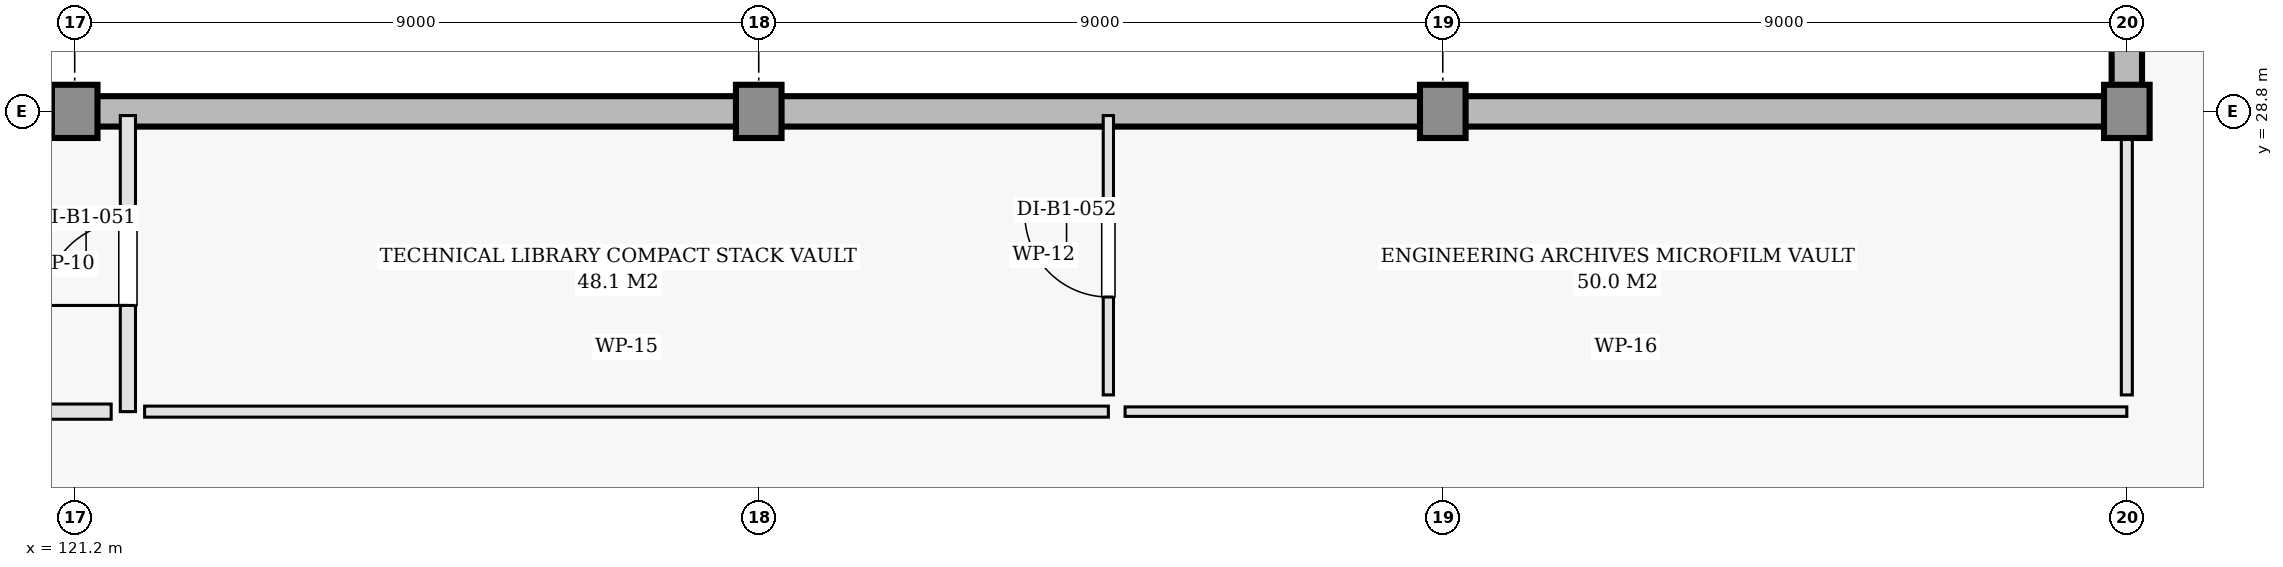
"""IFC4 building model, lengths in metres.
Left out: names, types, materials, properties, quantities, classifications, styles, units other than length and angle.
Written with IfcOpenShell. Run it as: python <this file> out.ifc"""

import sys

from ifc_helpers import new_model, si_unit, direction, frame, frame_2d, origin, origin_2d, place, context, subcontext, project, spatial, rectangle, extrude, element, fill, save


model = new_model("IFC4")
c1 = context("Model", 3, precision=1e-05, world=origin(), true_north=direction((0.0, 1.0)))
c2 = subcontext(c1, "Body", "Model", "MODEL_VIEW")
j1 = project(units=[si_unit("LENGTHUNIT", "METRE"), si_unit("PLANEANGLEUNIT", "RADIAN")], contexts=[c1])
p1 = place(None, origin())
s1 = spatial("IfcSite", under=j1, at=p1, CompositionType="ELEMENT")
p2 = place(p1, origin())
s2 = spatial("IfcBuilding", under=s1, at=p2, CompositionType="ELEMENT")
p3 = place(p2, frame((0.0, 0.0, -4.5)))
s3 = spatial("IfcBuildingStorey", under=s2, at=p3, CompositionType="ELEMENT", Elevation=-4.5)
for number, where, z_axis, x_axis in (
    (1, (121.2, 28.8, 0.0), (0.0, 0.0, 1.0), (1.0, 0.0, 0.0)),
    (2, (130.2, 28.8, 0.0), (0.0, 0.0, 1.0), (1.0, 0.0, 0.0)),
    (3, (139.2, 28.8, 0.0), (0.0, 0.0, 1.0), (1.0, 0.0, 0.0)),
    (4, (148.2, 28.8, 0.0), (0.0, 0.0, 1.0), (1.0, 0.0, 0.0)),
):
    element("IfcColumn", number, at=place(p3, frame(where, z_axis=z_axis, x_axis=x_axis)), inside=s3, PredefinedType="COLUMN", context=c2, shape_type="SweptSolid", body=[
        extrude(rectangle(XDim=0.7, YDim=0.7, at=origin_2d()), origin(), (0.0, 0.0, 1.0), 4.5),
    ])
p4 = place(p3, frame((148.2, 57.6, 0.0), z_axis=(0.0, 0.0, 1.0), x_axis=(0.0, -1.0, 0.0)))
e5 = element("IfcWall", 5, at=p4, inside=s3, PredefinedType="USERDEFINED", context=c2, shape_type="SweptSolid", body=[
    extrude(rectangle(XDim=28.8, YDim=0.4, at=frame_2d((14.4, 0.0))), origin(), (0.0, 0.0, 1.0), 4.15),
])
p5 = place(p3, frame((148.2, 28.8, 0.0), z_axis=(0.0, 0.0, 1.0), x_axis=(-1.0, 0.0, 0.0)))
e6 = element("IfcWall", 6, at=p5, inside=s3, PredefinedType="USERDEFINED", context=c2, shape_type="SweptSolid", body=[
    extrude(rectangle(XDim=36.0, YDim=0.4, at=frame_2d((18.0, 0.0))), origin(), (0.0, 0.0, 1.0), 4.15),
])
p6 = place(p3, frame((121.9, 24.85, 0.0), z_axis=(0.0, 0.0, 1.0), x_axis=(0.0, 1.0, 0.0)))
e7 = element("IfcWall", 7, at=p6, inside=s3, PredefinedType="PARTITIONING", context=c2, shape_type="SweptSolid", body=[
    extrude(rectangle(XDim=3.895, YDim=0.2, at=frame_2d((1.948, 0.0))), origin(), (0.0, 0.0, 1.0), 3.335),
])
p7 = place(p6, frame((1.397, 0.0, 0.0)))
e8 = element("IfcOpeningElement", 8, at=p7, cuts=e7, PredefinedType="OPENING", context=c2, shape_type="SweptSolid", body=[
    extrude(rectangle(XDim=1.1, YDim=2.15, at=frame_2d((0.55, 1.075))), frame((0.0, 0.11, 0.0), z_axis=(0.0, -1.0, 0.0), x_axis=(1.0, 0.0, 0.0)), (0.0, 0.0, 1.0), 0.22),
])
p8 = place(p3, frame((122.12, 24.85, 0.0), z_axis=(0.0, 0.0, 1.0), x_axis=(1.0, 0.0, 0.0)))
e9 = element("IfcWall", 9, at=p8, inside=s3, PredefinedType="PARTITIONING", context=c2, shape_type="SweptSolid", body=[
    extrude(rectangle(XDim=12.68, YDim=0.145, at=frame_2d((6.34, 0.0))), origin(), (0.0, 0.0, 1.0), 4.15),
])
p9 = place(p3, frame((134.8, 25.07, 0.0), z_axis=(0.0, 0.0, 1.0), x_axis=(0.0, 1.0, 0.0)))
e10 = element("IfcWall", 10, at=p9, inside=s3, PredefinedType="PARTITIONING", context=c2, shape_type="SweptSolid", body=[
    extrude(rectangle(XDim=3.675, YDim=0.135, at=frame_2d((1.837, 0.0))), origin(), (0.0, 0.0, 1.0), 3.335),
])
p10 = place(p9, frame((1.288, 0.0, 0.0)))
e11 = element("IfcOpeningElement", 11, at=p10, cuts=e10, PredefinedType="OPENING", context=c2, shape_type="SweptSolid", body=[
    extrude(rectangle(XDim=1.1, YDim=2.15, at=frame_2d((0.55, 1.075))), frame((0.0, 0.078, 0.0), z_axis=(0.0, -1.0, 0.0), x_axis=(1.0, 0.0, 0.0)), (0.0, 0.0, 1.0), 0.155),
])
p11 = place(p3, frame((135.02, 24.85, 0.0), z_axis=(0.0, 0.0, 1.0), x_axis=(1.0, 0.0, 0.0)))
e12 = element("IfcWall", 12, at=p11, inside=s3, PredefinedType="PARTITIONING", context=c2, shape_type="SweptSolid", body=[
    extrude(rectangle(XDim=13.18, YDim=0.125, at=frame_2d((6.59, 0.0))), origin(), (0.0, 0.0, 1.0), 3.485),
])
p12 = place(p3, frame((148.2, 25.07, 0.0), z_axis=(0.0, 0.0, 1.0), x_axis=(0.0, 1.0, 0.0)))
e13 = element("IfcWall", 13, at=p12, inside=s3, PredefinedType="PARTITIONING", context=c2, shape_type="SweptSolid", body=[
    extrude(rectangle(XDim=3.47, YDim=0.145, at=frame_2d((1.735, 0.0))), origin(), (0.0, 0.0, 1.0), 3.485),
])
p13 = place(p3, frame((112.255, 24.85, 0.0), z_axis=(0.0, 0.0, 1.0), x_axis=(1.0, 0.0, 0.0)))
e14 = element("IfcWall", 14, at=p13, inside=s3, PredefinedType="PARTITIONING", context=c2, shape_type="SweptSolid", body=[
    extrude(rectangle(XDim=9.425, YDim=0.2, at=frame_2d((4.712, 0.0))), origin(), (0.0, 0.0, 1.0), 3.485),
])
p14 = place(p7, origin())
e15 = element("IfcDoor", 15, at=p14, inside=s3, OperationType="SINGLE_SWING_LEFT", PredefinedType="DOOR", context=c2, shape_type="SweptSolid", body=[
    extrude(rectangle(XDim=1.1, YDim=2.15, at=frame_2d((0.55, 1.075))), frame((0.0, 0.025, 0.0), z_axis=(0.0, -1.0, 0.0), x_axis=(1.0, 0.0, 0.0)), (0.0, 0.0, 1.0), 0.05),
])
fill(e8, e15)
p15 = place(p10, origin())
e16 = element("IfcDoor", 16, at=p15, inside=s3, OperationType="SINGLE_SWING_RIGHT", PredefinedType="DOOR", context=c2, shape_type="SweptSolid", body=[
    extrude(rectangle(XDim=1.1, YDim=2.15, at=frame_2d((0.55, 1.075))), frame((0.0, 0.025, 0.0), z_axis=(0.0, -1.0, 0.0), x_axis=(1.0, 0.0, 0.0)), (0.0, 0.0, 1.0), 0.05),
])
fill(e11, e16)
save(model, sys.argv[1])
